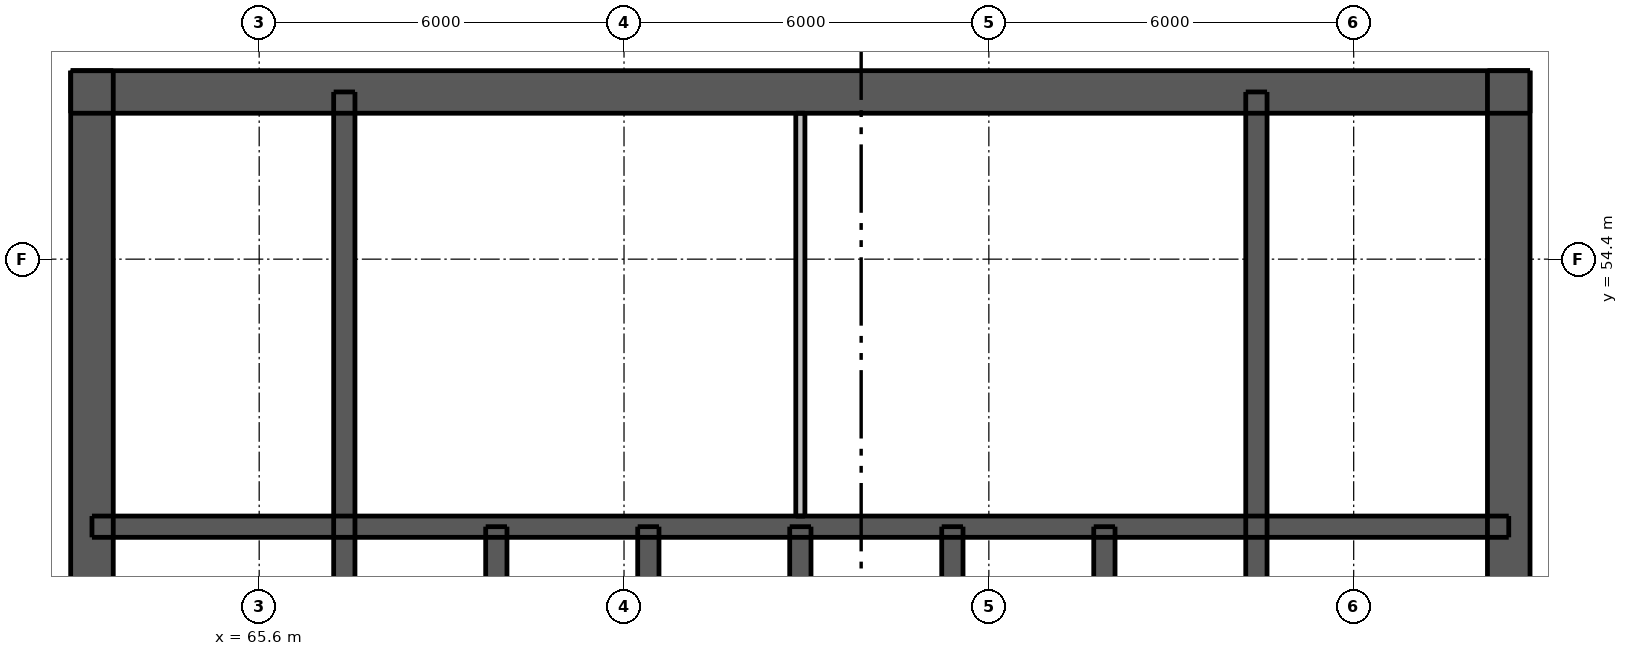
"""IFC4 building model, lengths in metres.
Left out: names, types, materials, properties, quantities, classifications, styles, units other than length and angle.
Written with IfcOpenShell. Run it as: python <this file> out.ifc"""

import sys

from ifc_helpers import new_model, si_unit, direction, frame, frame_2d, origin, place, context, subcontext, project, spatial, rectangle, extrude, element, fill, save


model = new_model("IFC4")
c1 = context("Model", 3, precision=1e-05, world=origin(), true_north=direction((0.0, 1.0)))
c2 = subcontext(c1, "Body", "Model", "MODEL_VIEW")
j1 = project(units=[si_unit("LENGTHUNIT", "METRE"), si_unit("PLANEANGLEUNIT", "RADIAN")], contexts=[c1])
p1 = place(None, origin())
s1 = spatial("IfcSite", under=j1, at=p1, CompositionType="ELEMENT")
p2 = place(p1, origin())
s2 = spatial("IfcBuilding", under=s1, at=p2, CompositionType="ELEMENT")
p3 = place(p2, frame((0.0, 0.0, 171.4)))
s3 = spatial("IfcBuildingStorey", under=s2, at=p3, CompositionType="ELEMENT", Elevation=171.4)
p4 = place(p3, frame((62.5, 57.15, 0.0), z_axis=(0.0, 0.0, 1.0), x_axis=(1.0, 0.0, 0.0)))
e1 = element("IfcWall", 1, at=p4, inside=s3, PredefinedType="SHEAR", context=c2, shape_type="SweptSolid", body=[
    extrude(rectangle(XDim=24.0, YDim=0.7, at=frame_2d((12.0, 0.0))), origin(), (0.0, 0.0, 1.0), 3.05),
])
p5 = place(p4, frame((20.938, 0.0, 0.0)))
e2 = element("IfcOpeningElement", 2, at=p5, cuts=e1, PredefinedType="OPENING", context=c2, shape_type="SweptSolid", body=[
    extrude(rectangle(XDim=1.1, YDim=2.1, at=frame_2d((0.55, 1.05))), frame((0.0, 0.36, 0.0), z_axis=(0.0, -1.0, 0.0), x_axis=(1.0, 0.0, 0.0)), (0.0, 0.0, 1.0), 0.72),
])
p6 = place(p4, frame((1.962, 0.0, 0.0)))
e3 = element("IfcOpeningElement", 3, at=p6, cuts=e1, PredefinedType="OPENING", context=c2, shape_type="SweptSolid", body=[
    extrude(rectangle(XDim=1.1, YDim=2.1, at=frame_2d((0.55, 1.05))), frame((0.0, 0.36, 0.0), z_axis=(0.0, -1.0, 0.0), x_axis=(1.0, 0.0, 0.0)), (0.0, 0.0, 1.0), 0.72),
])
p7 = place(p4, frame((7.887, 0.0, 0.0)))
e4 = element("IfcOpeningElement", 4, at=p7, cuts=e1, PredefinedType="OPENING", context=c2, shape_type="SweptSolid", body=[
    extrude(rectangle(XDim=0.9, YDim=2.1, at=frame_2d((0.45, 1.05))), frame((0.0, 0.36, 0.0), z_axis=(0.0, -1.0, 0.0), x_axis=(1.0, 0.0, 0.0)), (0.0, 0.0, 1.0), 0.72),
])
p8 = place(p4, frame((15.212, 0.0, 0.0)))
e5 = element("IfcOpeningElement", 5, at=p8, cuts=e1, PredefinedType="OPENING", context=c2, shape_type="SweptSolid", body=[
    extrude(rectangle(XDim=0.9, YDim=2.1, at=frame_2d((0.45, 1.05))), frame((0.0, 0.36, 0.0), z_axis=(0.0, -1.0, 0.0), x_axis=(1.0, 0.0, 0.0)), (0.0, 0.0, 1.0), 0.72),
])
p9 = place(p3, frame((62.85, 33.5, 0.0), z_axis=(0.0, 0.0, 1.0), x_axis=(0.0, 1.0, 0.0)))
e6 = element("IfcWall", 6, at=p9, inside=s3, PredefinedType="SHEAR", context=c2, shape_type="SweptSolid", body=[
    extrude(rectangle(XDim=24.0, YDim=0.7, at=frame_2d((12.0, 0.0))), origin(), (0.0, 0.0, 1.0), 3.05),
])
p10 = place(p9, frame((11.2, 0.0, 0.0)))
e7 = element("IfcOpeningElement", 7, at=p10, cuts=e6, PredefinedType="OPENING", context=c2, shape_type="SweptSolid", body=[
    extrude(rectangle(XDim=1.6, YDim=2.1, at=frame_2d((0.8, 1.05))), frame((0.0, 0.36, 0.0), z_axis=(0.0, -1.0, 0.0), x_axis=(1.0, 0.0, 0.0)), (0.0, 0.0, 1.0), 0.72),
])
p11 = place(p3, frame((86.15, 33.5, 0.0), z_axis=(0.0, 0.0, 1.0), x_axis=(0.0, 1.0, 0.0)))
e8 = element("IfcWall", 8, at=p11, inside=s3, PredefinedType="SHEAR", context=c2, shape_type="SweptSolid", body=[
    extrude(rectangle(XDim=24.0, YDim=0.7, at=frame_2d((12.0, 0.0))), origin(), (0.0, 0.0, 1.0), 3.05),
])
p12 = place(p11, frame((11.2, 0.0, 0.0)))
e9 = element("IfcOpeningElement", 9, at=p12, cuts=e8, PredefinedType="OPENING", context=c2, shape_type="SweptSolid", body=[
    extrude(rectangle(XDim=1.6, YDim=2.1, at=frame_2d((0.8, 1.05))), frame((0.0, 0.36, 0.0), z_axis=(0.0, -1.0, 0.0), x_axis=(1.0, 0.0, 0.0)), (0.0, 0.0, 1.0), 0.72),
])
p13 = place(p3, frame((62.85, 50.0, 0.0), z_axis=(0.0, 0.0, 1.0), x_axis=(1.0, 0.0, 0.0)))
e10 = element("IfcWall", 10, at=p13, inside=s3, PredefinedType="SHEAR", context=c2, shape_type="SweptSolid", body=[
    extrude(rectangle(XDim=23.3, YDim=0.35, at=frame_2d((11.65, 0.0))), origin(), (0.0, 0.0, 1.0), 3.05),
])
for number, where, z_axis, x_axis in (
    (11, (67.0, 47.1, 0.0), (0.0, 0.0, 1.0), (0.0, 1.0, 0.0)),
    (12, (82.0, 47.1, 0.0), (0.0, 0.0, 1.0), (0.0, 1.0, 0.0)),
):
    element("IfcWall", number, at=place(p3, frame(where, z_axis=z_axis, x_axis=x_axis)), inside=s3, PredefinedType="SHEAR", context=c2, shape_type="SweptSolid", body=[
        extrude(rectangle(XDim=10.05, YDim=0.35, at=frame_2d((5.025, 0.0))), origin(), (0.0, 0.0, 1.0), 3.05),
    ])
for number, where, z_axis, x_axis in (
    (13, (69.5, 47.1, 0.0), (0.0, 0.0, 1.0), (0.0, 1.0, 0.0)),
    (14, (72.0, 47.1, 0.0), (0.0, 0.0, 1.0), (0.0, 1.0, 0.0)),
    (15, (74.5, 47.1, 0.0), (0.0, 0.0, 1.0), (0.0, 1.0, 0.0)),
    (16, (77.0, 47.1, 0.0), (0.0, 0.0, 1.0), (0.0, 1.0, 0.0)),
    (17, (79.5, 47.1, 0.0), (0.0, 0.0, 1.0), (0.0, 1.0, 0.0)),
):
    element("IfcWall", number, at=place(p3, frame(where, z_axis=z_axis, x_axis=x_axis)), inside=s3, PredefinedType="SHEAR", context=c2, shape_type="SweptSolid", body=[
        extrude(rectangle(XDim=2.9, YDim=0.35, at=frame_2d((1.45, 0.0))), origin(), (0.0, 0.0, 1.0), 3.05),
    ])
p14 = place(p3, frame((74.5, 50.175, 0.0), z_axis=(0.0, 0.0, 1.0), x_axis=(0.0, 1.0, 0.0)))
e18 = element("IfcWall", 18, at=p14, inside=s3, PredefinedType="PLUMBINGWALL", context=c2, shape_type="SweptSolid", body=[
    extrude(rectangle(XDim=6.625, YDim=0.15, at=frame_2d((3.312, 0.0))), origin(), (0.0, 0.0, 1.0), 3.05),
])
p15 = place(p5, origin())
e19 = element("IfcDoor", 19, at=p15, inside=s3, OperationType="SINGLE_SWING_RIGHT", PredefinedType="DOOR", context=c2, shape_type="SweptSolid", body=[
    extrude(rectangle(XDim=1.1, YDim=2.1, at=frame_2d((0.55, 1.05))), frame((0.0, -0.288, 0.0), z_axis=(0.0, -1.0, 0.0), x_axis=(1.0, 0.0, 0.0)), (0.0, 0.0, 1.0), 0.05),
])
fill(e2, e19)
p16 = place(p6, origin())
e20 = element("IfcDoor", 20, at=p16, inside=s3, OperationType="SINGLE_SWING_LEFT", PredefinedType="DOOR", context=c2, shape_type="SweptSolid", body=[
    extrude(rectangle(XDim=1.1, YDim=2.1, at=frame_2d((0.55, 1.05))), frame((0.0, -0.288, 0.0), z_axis=(0.0, -1.0, 0.0), x_axis=(1.0, 0.0, 0.0)), (0.0, 0.0, 1.0), 0.05),
])
fill(e3, e20)
p17 = place(p7, origin())
e21 = element("IfcDoor", 21, at=p17, inside=s3, OperationType="SINGLE_SWING_RIGHT", PredefinedType="DOOR", context=c2, shape_type="SweptSolid", body=[
    extrude(rectangle(XDim=0.9, YDim=2.1, at=frame_2d((0.45, 1.05))), frame((0.0, -0.288, 0.0), z_axis=(0.0, -1.0, 0.0), x_axis=(1.0, 0.0, 0.0)), (0.0, 0.0, 1.0), 0.05),
])
fill(e4, e21)
p18 = place(p8, origin())
e22 = element("IfcDoor", 22, at=p18, inside=s3, OperationType="SINGLE_SWING_RIGHT", PredefinedType="DOOR", context=c2, shape_type="SweptSolid", body=[
    extrude(rectangle(XDim=0.9, YDim=2.1, at=frame_2d((0.45, 1.05))), frame((0.0, -0.288, 0.0), z_axis=(0.0, -1.0, 0.0), x_axis=(1.0, 0.0, 0.0)), (0.0, 0.0, 1.0), 0.05),
])
fill(e5, e22)
save(model, sys.argv[1])
